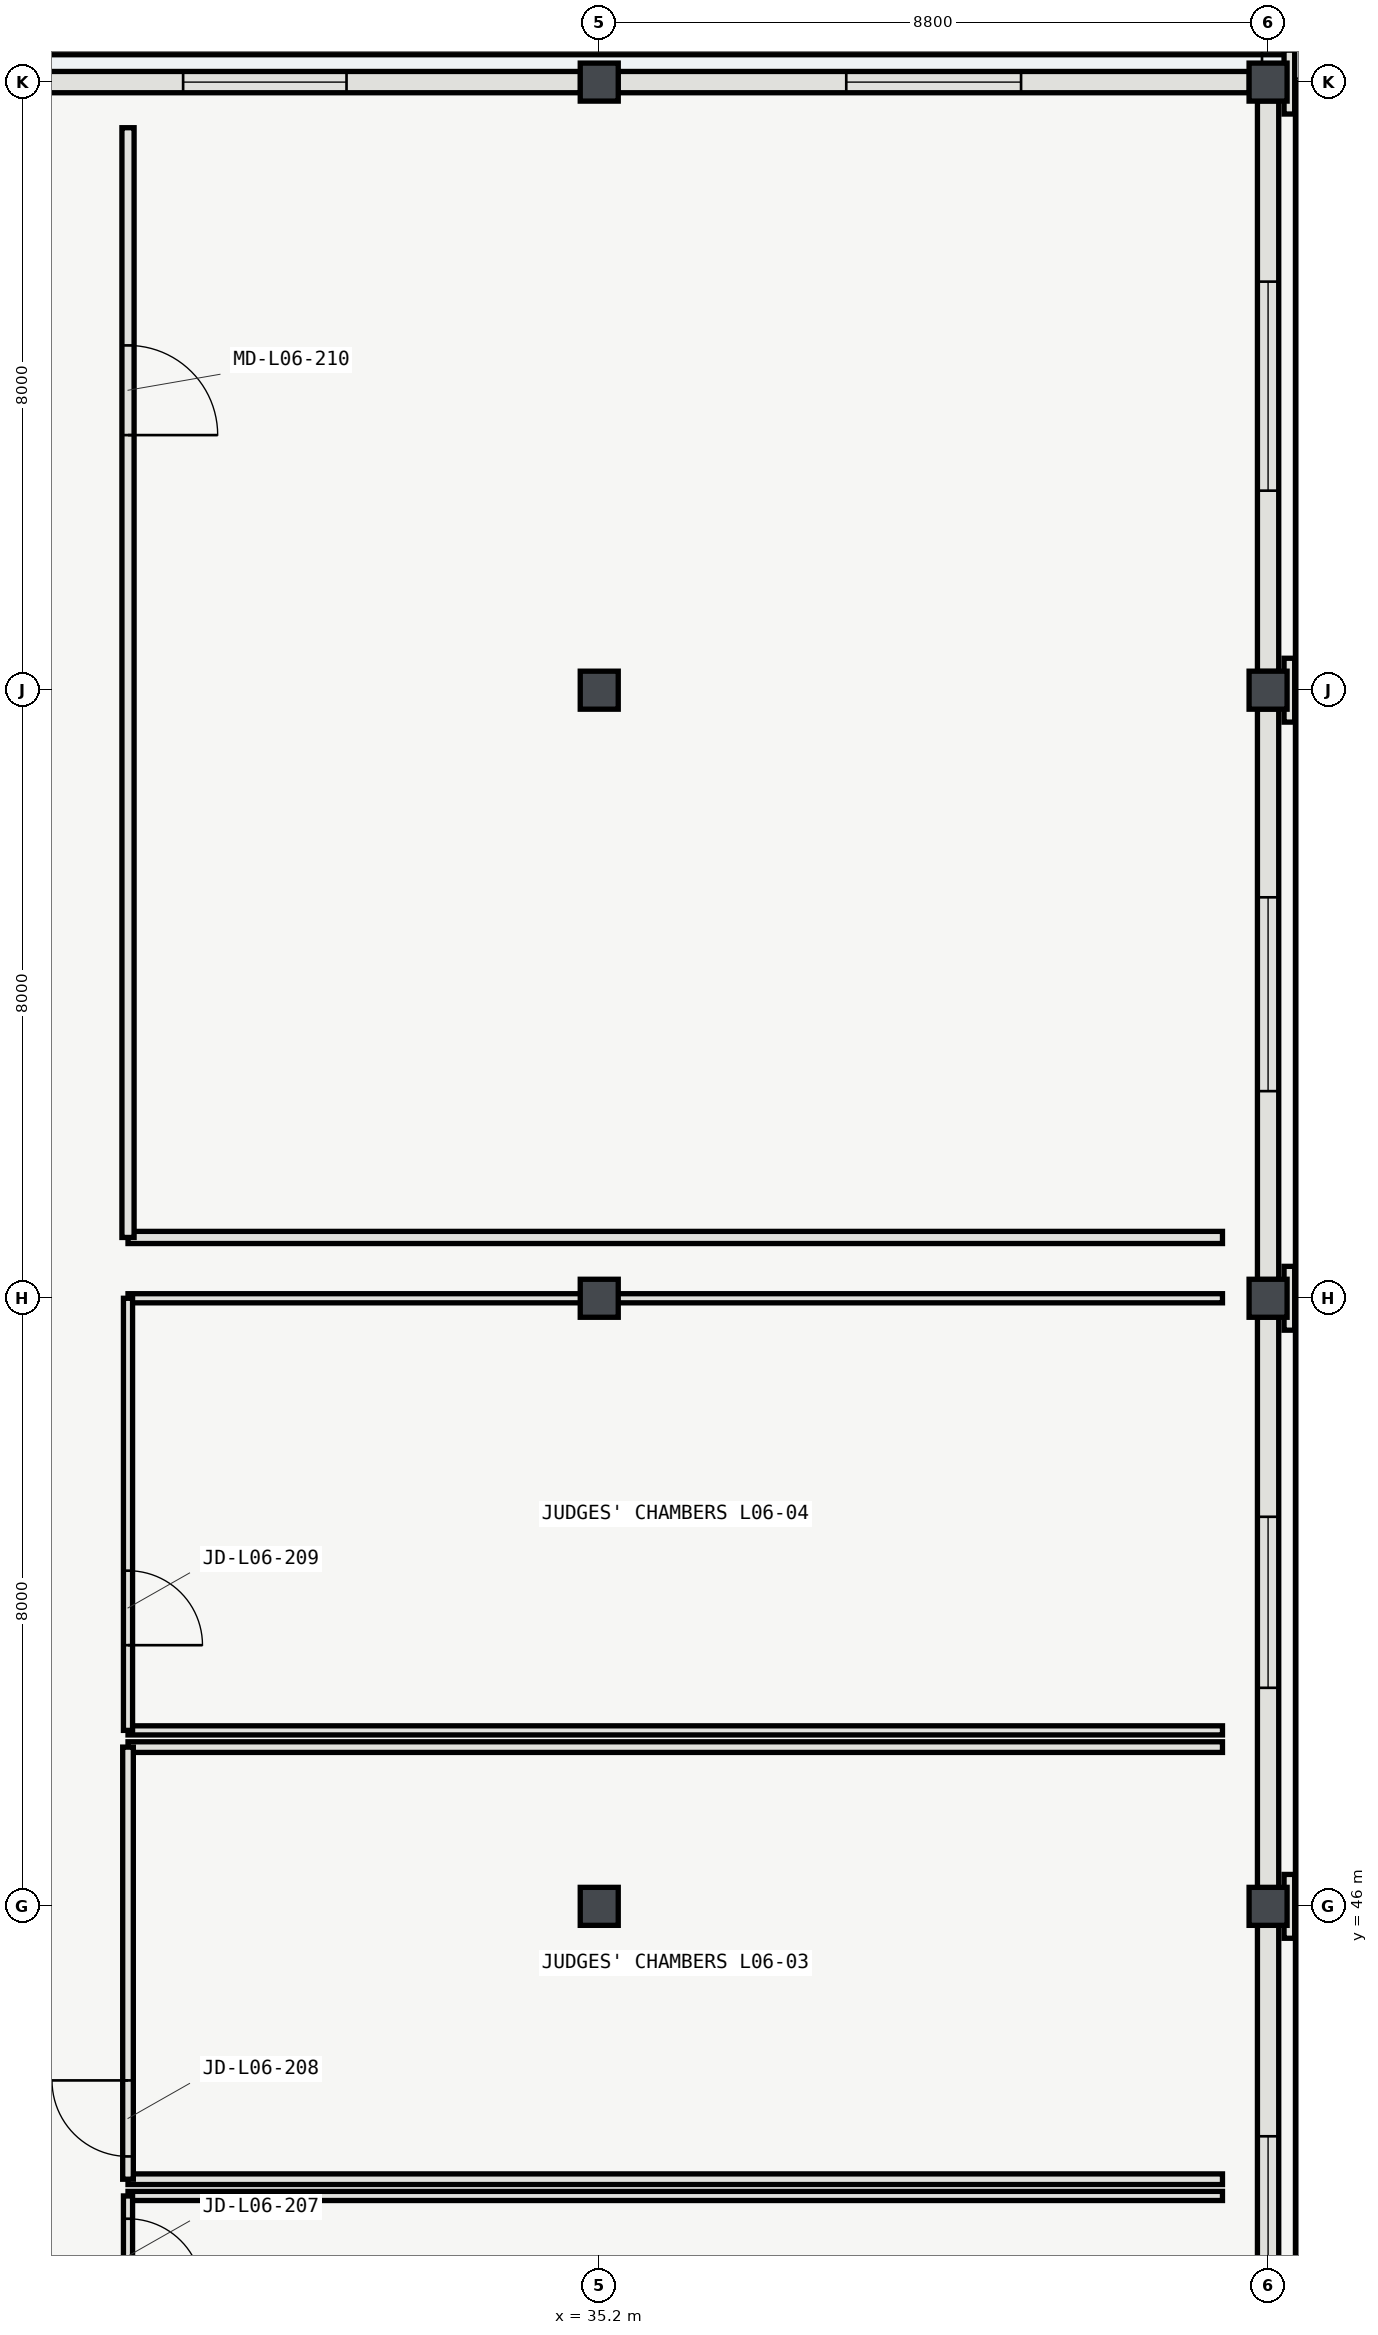
"""IFC4 building model, lengths in metres.
Left out: names, types, materials, properties, quantities, classifications, styles, units other than length and angle.
Written with IfcOpenShell. Run it as: python <this file> out.ifc"""

import sys

from ifc_helpers import new_model, si_unit, direction, frame, frame_2d, origin, origin_2d, place, context, subcontext, project, spatial, rectangle, hollow_rectangle, extrude, element, fill, save


model = new_model("IFC4")
c1 = context("Model", 3, precision=1e-05, world=origin(), true_north=direction((0.0, 1.0)))
c2 = subcontext(c1, "Body", "Model", "MODEL_VIEW")
j1 = project(units=[si_unit("LENGTHUNIT", "METRE"), si_unit("PLANEANGLEUNIT", "RADIAN")], contexts=[c1])
p1 = place(None, origin())
s1 = spatial("IfcSite", under=j1, at=p1, CompositionType="ELEMENT")
p2 = place(p1, origin())
s2 = spatial("IfcBuilding", under=s1, at=p2, CompositionType="ELEMENT")
p3 = place(p2, frame((0.0, 0.0, 28.8)))
s3 = spatial("IfcBuildingStorey", under=s2, at=p3, CompositionType="ELEMENT", Elevation=28.8)
for number, where, z_axis, x_axis in (
    (1, (35.2, 46.0, 0.0), (0.0, 0.0, 1.0), (1.0, 0.0, 0.0)),
    (2, (35.2, 54.0, 0.0), (0.0, 0.0, 1.0), (1.0, 0.0, 0.0)),
    (3, (35.2, 62.0, 0.0), (0.0, 0.0, 1.0), (1.0, 0.0, 0.0)),
    (4, (35.2, 70.0, 0.0), (0.0, 0.0, 1.0), (1.0, 0.0, 0.0)),
    (5, (44.0, 46.0, 0.0), (0.0, 0.0, 1.0), (1.0, 0.0, 0.0)),
    (6, (44.0, 54.0, 0.0), (0.0, 0.0, 1.0), (1.0, 0.0, 0.0)),
    (7, (44.0, 62.0, 0.0), (0.0, 0.0, 1.0), (1.0, 0.0, 0.0)),
    (8, (44.0, 70.0, 0.0), (0.0, 0.0, 1.0), (1.0, 0.0, 0.0)),
):
    element("IfcColumn", number, at=place(p3, frame(where, z_axis=z_axis, x_axis=x_axis)), inside=s3, PredefinedType="COLUMN", context=c2, shape_type="SweptSolid", body=[
        extrude(hollow_rectangle(XDim=0.5, YDim=0.5, WallThickness=0.02, InnerFilletRadius=0.02, OuterFilletRadius=0.04, at=origin_2d()), origin(), (0.0, 0.0, 1.0), 4.2),
    ])
p4 = place(p3, frame((34.954, 70.0, 0.0), z_axis=(0.0, 0.0, 1.0), x_axis=(-1.0, 0.0, 0.0)))
e9 = element("IfcWall", 9, at=p4, inside=s3, PredefinedType="SOLIDWALL", context=c2, shape_type="SweptSolid", body=[
    extrude(rectangle(XDim=8.258, YDim=0.28, at=frame_2d((4.129, 0.0))), origin(), (0.0, 0.0, 1.0), 3.483),
])
p5 = place(p4, frame((3.079, 0.0, 0.95)))
e10 = element("IfcOpeningElement", 10, at=p5, cuts=e9, PredefinedType="OPENING", context=c2, shape_type="SweptSolid", body=[
    extrude(rectangle(XDim=2.15, YDim=1.6, at=frame_2d((1.075, 0.8))), frame((0.0, 0.15, 0.0), z_axis=(0.0, -1.0, 0.0), x_axis=(1.0, 0.0, 0.0)), (0.0, 0.0, 1.0), 0.3),
])
p6 = place(p3, frame((43.754, 70.0, 0.0), z_axis=(0.0, 0.0, 1.0), x_axis=(-1.0, 0.0, 0.0)))
e11 = element("IfcWall", 11, at=p6, inside=s3, PredefinedType="SOLIDWALL", context=c2, shape_type="SweptSolid", body=[
    extrude(rectangle(XDim=8.308, YDim=0.28, at=frame_2d((4.154, 0.0))), origin(), (0.0, 0.0, 1.0), 3.483),
])
p7 = place(p6, frame((3.004, 0.0, 0.95)))
e12 = element("IfcOpeningElement", 12, at=p7, cuts=e11, PredefinedType="OPENING", context=c2, shape_type="SweptSolid", body=[
    extrude(rectangle(XDim=2.3, YDim=1.6, at=frame_2d((1.15, 0.8))), frame((0.0, 0.15, 0.0), z_axis=(0.0, -1.0, 0.0), x_axis=(1.0, 0.0, 0.0)), (0.0, 0.0, 1.0), 0.3),
])
p8 = place(p3, frame((44.0, 38.246, 0.0), z_axis=(0.0, 0.0, 1.0), x_axis=(0.0, 1.0, 0.0)))
e13 = element("IfcWall", 13, at=p8, inside=s3, PredefinedType="SOLIDWALL", context=c2, shape_type="SweptSolid", body=[
    extrude(rectangle(XDim=7.508, YDim=0.28, at=frame_2d((3.754, 0.0))), origin(), (0.0, 0.0, 1.0), 3.483),
])
p9 = place(p8, frame((2.779, 0.0, 0.95)))
e14 = element("IfcOpeningElement", 14, at=p9, cuts=e13, PredefinedType="OPENING", context=c2, shape_type="SweptSolid", body=[
    extrude(rectangle(XDim=1.95, YDim=1.95, at=frame_2d((0.975, 0.975))), frame((0.0, 0.15, 0.0), z_axis=(0.0, -1.0, 0.0), x_axis=(1.0, 0.0, 0.0)), (0.0, 0.0, 1.0), 0.3),
])
p10 = place(p3, frame((44.0, 46.246, 0.0), z_axis=(0.0, 0.0, 1.0), x_axis=(0.0, 1.0, 0.0)))
e15 = element("IfcWall", 15, at=p10, inside=s3, PredefinedType="SOLIDWALL", context=c2, shape_type="SweptSolid", body=[
    extrude(rectangle(XDim=7.508, YDim=0.28, at=frame_2d((3.754, 0.0))), origin(), (0.0, 0.0, 1.0), 3.483),
])
p11 = place(p10, frame((2.629, 0.0, 0.95)))
e16 = element("IfcOpeningElement", 16, at=p11, cuts=e15, PredefinedType="OPENING", context=c2, shape_type="SweptSolid", body=[
    extrude(rectangle(XDim=2.25, YDim=1.95, at=frame_2d((1.125, 0.975))), frame((0.0, 0.15, 0.0), z_axis=(0.0, -1.0, 0.0), x_axis=(1.0, 0.0, 0.0)), (0.0, 0.0, 1.0), 0.3),
])
p12 = place(p3, frame((44.0, 54.246, 0.0), z_axis=(0.0, 0.0, 1.0), x_axis=(0.0, 1.0, 0.0)))
e17 = element("IfcWall", 17, at=p12, inside=s3, PredefinedType="SOLIDWALL", context=c2, shape_type="SweptSolid", body=[
    extrude(rectangle(XDim=7.508, YDim=0.28, at=frame_2d((3.754, 0.0))), origin(), (0.0, 0.0, 1.0), 3.483),
])
p13 = place(p12, frame((2.479, 0.0, 0.95)))
e18 = element("IfcOpeningElement", 18, at=p13, cuts=e17, PredefinedType="OPENING", context=c2, shape_type="SweptSolid", body=[
    extrude(rectangle(XDim=2.55, YDim=1.95, at=frame_2d((1.275, 0.975))), frame((0.0, 0.15, 0.0), z_axis=(0.0, -1.0, 0.0), x_axis=(1.0, 0.0, 0.0)), (0.0, 0.0, 1.0), 0.3),
])
p14 = place(p3, frame((44.0, 62.246, 0.0), z_axis=(0.0, 0.0, 1.0), x_axis=(0.0, 1.0, 0.0)))
e19 = element("IfcWall", 19, at=p14, inside=s3, PredefinedType="SOLIDWALL", context=c2, shape_type="SweptSolid", body=[
    extrude(rectangle(XDim=7.508, YDim=0.28, at=frame_2d((3.754, 0.0))), origin(), (0.0, 0.0, 1.0), 3.483),
])
p15 = place(p14, frame((2.379, 0.0, 0.95)))
e20 = element("IfcOpeningElement", 20, at=p15, cuts=e19, PredefinedType="OPENING", context=c2, shape_type="SweptSolid", body=[
    extrude(rectangle(XDim=2.75, YDim=1.95, at=frame_2d((1.375, 0.975))), frame((0.0, 0.15, 0.0), z_axis=(0.0, -1.0, 0.0), x_axis=(1.0, 0.0, 0.0)), (0.0, 0.0, 1.0), 0.3),
])
p16 = place(p3, frame((44.44, 30.0, 0.0), z_axis=(0.0, 0.0, 1.0), x_axis=(0.0, 1.0, 0.0)))
e21 = element("IfcWall", 21, at=p16, inside=s3, PredefinedType="SOLIDWALL", context=c2, shape_type="SweptSolid", body=[
    extrude(rectangle(XDim=40.0, YDim=0.16, at=frame_2d((20.0, 0.0))), origin(), (0.0, 0.0, 1.0), 0.58),
])
p17 = place(p3, frame((44.34, 70.44, 0.0), z_axis=(0.0, 0.0, 1.0), x_axis=(-1.0, 0.0, 0.0)))
e22 = element("IfcWall", 22, at=p17, inside=s3, PredefinedType="SOLIDWALL", context=c2, shape_type="SweptSolid", body=[
    extrude(rectangle(XDim=44.68, YDim=0.16, at=frame_2d((22.34, 0.0))), origin(), (0.0, 0.0, 1.0), 0.58),
])
for number, where, z_axis, x_axis in (
    (23, (44.28, 45.58, 0.0), (0.0, 0.0, 1.0), (0.0, 1.0, 0.0)),
    (24, (44.28, 53.58, 0.0), (0.0, 0.0, 1.0), (0.0, 1.0, 0.0)),
    (25, (44.28, 61.58, 0.0), (0.0, 0.0, 1.0), (0.0, 1.0, 0.0)),
    (26, (44.28, 69.58, 0.0), (0.0, 0.0, 1.0), (0.0, 1.0, 0.0)),
):
    element("IfcWall", number, at=place(p3, frame(where, z_axis=z_axis, x_axis=x_axis)), inside=s3, PredefinedType="SOLIDWALL", context=c2, shape_type="SweptSolid", body=[
        extrude(rectangle(XDim=0.84, YDim=0.14, at=frame_2d((0.42, 0.0))), origin(), (0.0, 0.0, 1.0), 3.94),
    ])
p18 = place(p3, frame((43.4, 42.19, 0.0), z_axis=(0.0, 0.0, 1.0), x_axis=(-1.0, 0.0, 0.0)))
e27 = element("IfcWall", 27, at=p18, inside=s3, PredefinedType="PARTITIONING", context=c2, shape_type="SweptSolid", body=[
    extrude(rectangle(XDim=14.4, YDim=0.12, at=frame_2d((7.2, 0.0))), origin(), (0.0, 0.0, 1.0), 3.92),
])
p19 = place(p3, frame((29.0, 42.19, 0.0), z_axis=(0.0, 0.0, 1.0), x_axis=(0.0, -1.0, 0.0)))
e28 = element("IfcWall", 28, at=p19, inside=s3, PredefinedType="PARTITIONING", context=c2, shape_type="SweptSolid", body=[
    extrude(rectangle(XDim=5.685, YDim=0.12, at=frame_2d((2.843, 0.0))), origin(), (0.0, 0.0, 1.0), 3.92),
])
p20 = place(p19, frame((0.3, 0.0, 0.0)))
e29 = element("IfcOpeningElement", 29, at=p20, cuts=e28, PredefinedType="OPENING", context=c2, shape_type="SweptSolid", body=[
    extrude(rectangle(XDim=0.98, YDim=2.15, at=frame_2d((0.49, 1.075))), frame((0.0, 0.07, 0.0), z_axis=(0.0, -1.0, 0.0), x_axis=(1.0, 0.0, 0.0)), (0.0, 0.0, 1.0), 0.14),
])
for number, where, z_axis, x_axis in (
    (30, (29.0, 42.41, 0.0), (0.0, 0.0, 1.0), (1.0, 0.0, 0.0)),
    (31, (43.4, 48.095, 0.0), (0.0, 0.0, 1.0), (-1.0, 0.0, 0.0)),
):
    element("IfcWall", number, at=place(p3, frame(where, z_axis=z_axis, x_axis=x_axis)), inside=s3, PredefinedType="PARTITIONING", context=c2, shape_type="SweptSolid", body=[
        extrude(rectangle(XDim=14.4, YDim=0.14, at=frame_2d((7.2, 0.0))), origin(), (0.0, 0.0, 1.0), 3.92),
    ])
p21 = place(p3, frame((29.0, 48.095, 0.0), z_axis=(0.0, 0.0, 1.0), x_axis=(0.0, -1.0, 0.0)))
e32 = element("IfcWall", 32, at=p21, inside=s3, PredefinedType="PARTITIONING", context=c2, shape_type="SweptSolid", body=[
    extrude(rectangle(XDim=5.685, YDim=0.14, at=frame_2d((2.843, 0.0))), origin(), (0.0, 0.0, 1.0), 3.92),
])
p22 = place(p21, frame((4.385, 0.0, 0.0)))
e33 = element("IfcOpeningElement", 33, at=p22, cuts=e32, PredefinedType="OPENING", context=c2, shape_type="SweptSolid", body=[
    extrude(rectangle(XDim=1.0, YDim=2.2, at=frame_2d((0.5, 1.1))), frame((0.0, 0.08, 0.0), z_axis=(0.0, -1.0, 0.0), x_axis=(1.0, 0.0, 0.0)), (0.0, 0.0, 1.0), 0.16),
])
p23 = place(p3, frame((29.0, 48.315, 0.0), z_axis=(0.0, 0.0, 1.0), x_axis=(1.0, 0.0, 0.0)))
e34 = element("IfcWall", 34, at=p23, inside=s3, PredefinedType="PARTITIONING", context=c2, shape_type="SweptSolid", body=[
    extrude(rectangle(XDim=14.4, YDim=0.12, at=frame_2d((7.2, 0.0))), origin(), (0.0, 0.0, 1.0), 3.92),
])
p24 = place(p3, frame((43.4, 54.0, 0.0), z_axis=(0.0, 0.0, 1.0), x_axis=(-1.0, 0.0, 0.0)))
e35 = element("IfcWall", 35, at=p24, inside=s3, PredefinedType="PARTITIONING", context=c2, shape_type="SweptSolid", body=[
    extrude(rectangle(XDim=14.4, YDim=0.12, at=frame_2d((7.2, 0.0))), origin(), (0.0, 0.0, 1.0), 3.486),
])
p25 = place(p3, frame((29.0, 54.0, 0.0), z_axis=(0.0, 0.0, 1.0), x_axis=(0.0, -1.0, 0.0)))
e36 = element("IfcWall", 36, at=p25, inside=s3, PredefinedType="PARTITIONING", context=c2, shape_type="SweptSolid", body=[
    extrude(rectangle(XDim=5.685, YDim=0.12, at=frame_2d((2.843, 0.0))), origin(), (0.0, 0.0, 1.0), 3.92),
])
p26 = place(p25, frame((3.584, 0.0, 0.0)))
e37 = element("IfcOpeningElement", 37, at=p26, cuts=e36, PredefinedType="OPENING", context=c2, shape_type="SweptSolid", body=[
    extrude(rectangle(XDim=0.98, YDim=2.2, at=frame_2d((0.49, 1.1))), frame((0.0, 0.07, 0.0), z_axis=(0.0, -1.0, 0.0), x_axis=(1.0, 0.0, 0.0)), (0.0, 0.0, 1.0), 0.14),
])
p27 = place(p3, frame((29.0, 54.8, 0.0), z_axis=(0.0, 0.0, 1.0), x_axis=(1.0, 0.0, 0.0)))
e38 = element("IfcWall", 38, at=p27, inside=s3, PredefinedType="PARTITIONING", context=c2, shape_type="SweptSolid", body=[
    extrude(rectangle(XDim=14.4, YDim=0.16, at=frame_2d((7.2, 0.0))), origin(), (0.0, 0.0, 1.0), 3.92),
])
p28 = place(p3, frame((29.0, 69.4, 0.0), z_axis=(0.0, 0.0, 1.0), x_axis=(0.0, -1.0, 0.0)))
e39 = element("IfcWall", 39, at=p28, inside=s3, PredefinedType="PARTITIONING", context=c2, shape_type="SweptSolid", body=[
    extrude(rectangle(XDim=14.6, YDim=0.16, at=frame_2d((7.3, 0.0))), origin(), (0.0, 0.0, 1.0), 3.92),
])
p29 = place(p28, frame((2.864, 0.0, 0.0)))
e40 = element("IfcOpeningElement", 40, at=p29, cuts=e39, PredefinedType="OPENING", context=c2, shape_type="SweptSolid", body=[
    extrude(rectangle(XDim=1.18, YDim=2.2, at=frame_2d((0.59, 1.1))), frame((0.0, 0.09, 0.0), z_axis=(0.0, -1.0, 0.0), x_axis=(1.0, 0.0, 0.0)), (0.0, 0.0, 1.0), 0.18),
])
p30 = place(p5, origin())
e41 = element("IfcWindow", 41, at=p30, inside=s3, PartitioningType="SINGLE_PANEL", PredefinedType="WINDOW", context=c2, shape_type="SweptSolid", body=[
    extrude(rectangle(XDim=2.15, YDim=1.6, at=frame_2d((1.075, 0.8))), frame((0.0, 0.03, 0.0), z_axis=(0.0, -1.0, 0.0), x_axis=(1.0, 0.0, 0.0)), (0.0, 0.0, 1.0), 0.06),
])
fill(e10, e41)
p31 = place(p7, origin())
e42 = element("IfcWindow", 42, at=p31, inside=s3, PartitioningType="SINGLE_PANEL", PredefinedType="WINDOW", context=c2, shape_type="SweptSolid", body=[
    extrude(rectangle(XDim=2.3, YDim=1.6, at=frame_2d((1.15, 0.8))), frame((0.0, 0.03, 0.0), z_axis=(0.0, -1.0, 0.0), x_axis=(1.0, 0.0, 0.0)), (0.0, 0.0, 1.0), 0.06),
])
fill(e12, e42)
p32 = place(p9, origin())
e43 = element("IfcWindow", 43, at=p32, inside=s3, PartitioningType="SINGLE_PANEL", PredefinedType="WINDOW", context=c2, shape_type="SweptSolid", body=[
    extrude(rectangle(XDim=1.95, YDim=1.95, at=frame_2d((0.975, 0.975))), frame((0.0, 0.03, 0.0), z_axis=(0.0, -1.0, 0.0), x_axis=(1.0, 0.0, 0.0)), (0.0, 0.0, 1.0), 0.06),
])
fill(e14, e43)
p33 = place(p11, origin())
e44 = element("IfcWindow", 44, at=p33, inside=s3, PartitioningType="SINGLE_PANEL", PredefinedType="WINDOW", context=c2, shape_type="SweptSolid", body=[
    extrude(rectangle(XDim=2.25, YDim=1.95, at=frame_2d((1.125, 0.975))), frame((0.0, 0.03, 0.0), z_axis=(0.0, -1.0, 0.0), x_axis=(1.0, 0.0, 0.0)), (0.0, 0.0, 1.0), 0.06),
])
fill(e16, e44)
p34 = place(p13, origin())
e45 = element("IfcWindow", 45, at=p34, inside=s3, PartitioningType="SINGLE_PANEL", PredefinedType="WINDOW", context=c2, shape_type="SweptSolid", body=[
    extrude(rectangle(XDim=2.55, YDim=1.95, at=frame_2d((1.275, 0.975))), frame((0.0, 0.03, 0.0), z_axis=(0.0, -1.0, 0.0), x_axis=(1.0, 0.0, 0.0)), (0.0, 0.0, 1.0), 0.06),
])
fill(e18, e45)
p35 = place(p15, origin())
e46 = element("IfcWindow", 46, at=p35, inside=s3, PartitioningType="SINGLE_PANEL", PredefinedType="WINDOW", context=c2, shape_type="SweptSolid", body=[
    extrude(rectangle(XDim=2.75, YDim=1.95, at=frame_2d((1.375, 0.975))), frame((0.0, 0.03, 0.0), z_axis=(0.0, -1.0, 0.0), x_axis=(1.0, 0.0, 0.0)), (0.0, 0.0, 1.0), 0.06),
])
fill(e20, e46)
p36 = place(p20, origin())
e47 = element("IfcDoor", 47, at=p36, inside=s3, OperationType="SINGLE_SWING_RIGHT", PredefinedType="DOOR", context=c2, shape_type="SweptSolid", body=[
    extrude(rectangle(XDim=0.98, YDim=2.15, at=frame_2d((0.49, 1.075))), frame((0.0, 0.025, 0.0), z_axis=(0.0, -1.0, 0.0), x_axis=(1.0, 0.0, 0.0)), (0.0, 0.0, 1.0), 0.05),
])
fill(e29, e47)
p37 = place(p22, origin())
e48 = element("IfcDoor", 48, at=p37, inside=s3, OperationType="SINGLE_SWING_LEFT", PredefinedType="DOOR", context=c2, shape_type="SweptSolid", body=[
    extrude(rectangle(XDim=1.0, YDim=2.2, at=frame_2d((0.5, 1.1))), frame((0.0, 0.025, 0.0), z_axis=(0.0, -1.0, 0.0), x_axis=(1.0, 0.0, 0.0)), (0.0, 0.0, 1.0), 0.05),
])
fill(e33, e48)
p38 = place(p26, origin())
e49 = element("IfcDoor", 49, at=p38, inside=s3, OperationType="SINGLE_SWING_RIGHT", PredefinedType="DOOR", context=c2, shape_type="SweptSolid", body=[
    extrude(rectangle(XDim=0.98, YDim=2.2, at=frame_2d((0.49, 1.1))), frame((0.0, 0.025, 0.0), z_axis=(0.0, -1.0, 0.0), x_axis=(1.0, 0.0, 0.0)), (0.0, 0.0, 1.0), 0.05),
])
fill(e37, e49)
p39 = place(p29, origin())
e50 = element("IfcDoor", 50, at=p39, inside=s3, OperationType="SINGLE_SWING_RIGHT", PredefinedType="DOOR", context=c2, shape_type="SweptSolid", body=[
    extrude(rectangle(XDim=1.18, YDim=2.2, at=frame_2d((0.59, 1.1))), frame((0.0, 0.025, 0.0), z_axis=(0.0, -1.0, 0.0), x_axis=(1.0, 0.0, 0.0)), (0.0, 0.0, 1.0), 0.05),
])
fill(e40, e50)
save(model, sys.argv[1])
